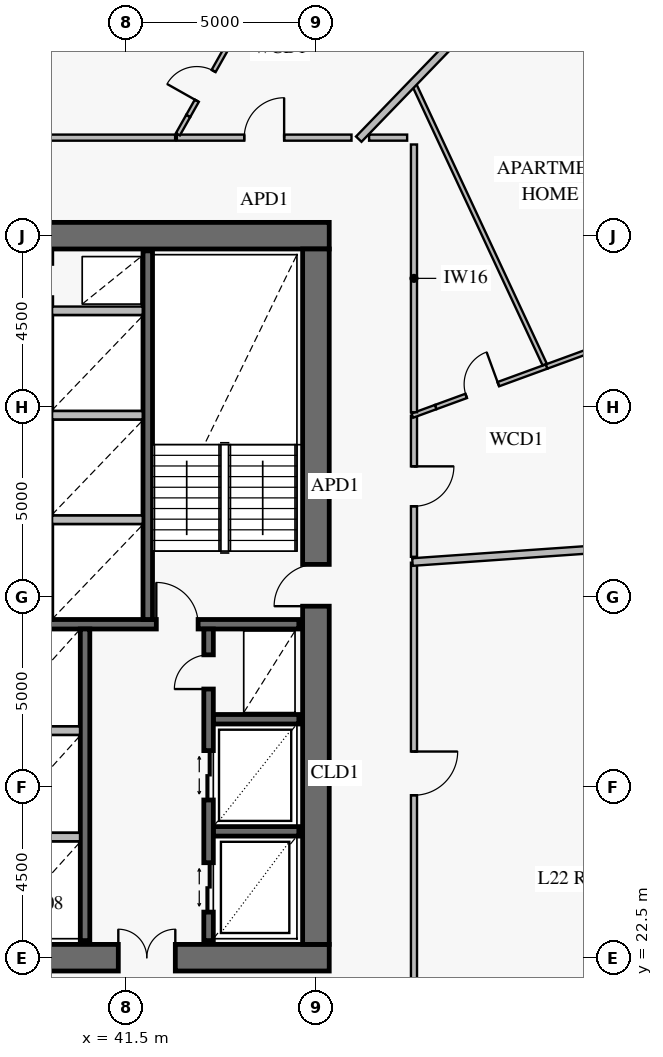
"""IFC4 building model, lengths in metres.
Left out: names, types, materials, properties, quantities, classifications, styles, units other than length and angle.
Written with IfcOpenShell. Run it as: python <this file> out.ifc"""

import sys

from ifc_helpers import new_model, si_unit, direction, frame, frame_2d, origin, place, context, subcontext, project, spatial, rectangle, extrude, element, fill, save


model = new_model("IFC4")
c1 = context("Model", 3, precision=1e-05, world=origin(), true_north=direction((0.0, 1.0)))
c2 = subcontext(c1, "Body", "Model", "MODEL_VIEW")
j1 = project(units=[si_unit("LENGTHUNIT", "METRE"), si_unit("PLANEANGLEUNIT", "RADIAN")], contexts=[c1])
p1 = place(None, origin())
s1 = spatial("IfcSite", under=j1, at=p1, CompositionType="ELEMENT")
p2 = place(p1, origin())
s2 = spatial("IfcBuilding", under=s1, at=p2, CompositionType="ELEMENT")
p3 = place(p2, frame((0.0, 0.0, 92.4)))
s3 = spatial("IfcBuildingStorey", under=s2, at=p3, CompositionType="ELEMENT", Elevation=92.4)
p4 = place(p3, frame((37.35, 22.5, 0.0), z_axis=(0.0, 0.0, 1.0), x_axis=(1.0, 0.0, 0.0)))
e1 = element("IfcWall", 1, at=p4, inside=s3, PredefinedType="SHEAR", context=c2, shape_type="SweptSolid", body=[
    extrude(rectangle(XDim=9.5, YDim=0.7, at=frame_2d((4.75, 0.0))), origin(), (0.0, 0.0, 1.0), 3.8),
])
p5 = place(p4, frame((3.95, 0.0, 0.0)))
e2 = element("IfcOpeningElement", 2, at=p5, cuts=e1, PredefinedType="OPENING", context=c2, shape_type="SweptSolid", body=[
    extrude(rectangle(XDim=1.5, YDim=2.15, at=frame_2d((0.75, 1.075))), frame((0.0, 0.362, 0.0), z_axis=(0.0, -1.0, 0.0), x_axis=(1.0, 0.0, 0.0)), (0.0, 0.0, 1.0), 0.724),
])
p6 = place(p3, frame((46.85, 41.5, 0.0), z_axis=(0.0, 0.0, 1.0), x_axis=(-1.0, 0.0, 0.0)))
e3 = element("IfcWall", 3, at=p6, inside=s3, PredefinedType="SHEAR", context=c2, shape_type="SweptSolid", body=[
    extrude(rectangle(XDim=7.9, YDim=0.7, at=frame_2d((3.95, 0.0))), origin(), (0.0, 0.0, 1.0), 3.8),
])
p7 = place(p3, frame((46.5, 22.85, 0.0), z_axis=(0.0, 0.0, 1.0), x_axis=(0.0, 1.0, 0.0)))
e4 = element("IfcWall", 4, at=p7, inside=s3, PredefinedType="SHEAR", context=c2, shape_type="SweptSolid", body=[
    extrude(rectangle(XDim=18.3, YDim=0.7, at=frame_2d((9.15, 0.0))), origin(), (0.0, 0.0, 1.0), 3.8),
])
p8 = place(p7, frame((8.9, 0.0, 0.0)))
e5 = element("IfcOpeningElement", 5, at=p8, cuts=e4, PredefinedType="OPENING", context=c2, shape_type="SweptSolid", body=[
    extrude(rectangle(XDim=1.1, YDim=2.15, at=frame_2d((0.55, 1.075))), frame((0.0, 0.362, 0.0), z_axis=(0.0, -1.0, 0.0), x_axis=(1.0, 0.0, 0.0)), (0.0, 0.0, 1.0), 0.724),
])
p9 = place(p3, frame((25.95, 31.275, 0.0), z_axis=(0.0, 0.0, 1.0), x_axis=(1.0, 0.0, 0.0)))
e6 = element("IfcWall", 6, at=p9, inside=s3, PredefinedType="SOLIDWALL", context=c2, shape_type="SweptSolid", body=[
    extrude(rectangle(XDim=20.1, YDim=0.25, at=frame_2d((10.05, 0.0))), origin(), (0.0, 0.0, 1.0), 3.8),
])
p10 = place(p9, frame((2.6, 0.0, 0.0)))
e7 = element("IfcOpeningElement", 7, at=p10, cuts=e6, PredefinedType="OPENING", context=c2, shape_type="SweptSolid", body=[
    extrude(rectangle(XDim=1.1, YDim=2.15, at=frame_2d((0.55, 1.075))), frame((0.0, 0.137, 0.0), z_axis=(0.0, -1.0, 0.0), x_axis=(1.0, 0.0, 0.0)), (0.0, 0.0, 1.0), 0.274),
])
p11 = place(p9, frame((10.6, 0.0, 0.0)))
e8 = element("IfcOpeningElement", 8, at=p11, cuts=e6, PredefinedType="OPENING", context=c2, shape_type="SweptSolid", body=[
    extrude(rectangle(XDim=1.1, YDim=2.15, at=frame_2d((0.55, 1.075))), frame((0.0, 0.137, 0.0), z_axis=(0.0, -1.0, 0.0), x_axis=(1.0, 0.0, 0.0)), (0.0, 0.0, 1.0), 0.274),
])
p12 = place(p9, frame((16.35, 0.0, 0.0)))
e9 = element("IfcOpeningElement", 9, at=p12, cuts=e6, PredefinedType="OPENING", context=c2, shape_type="SweptSolid", body=[
    extrude(rectangle(XDim=1.1, YDim=2.15, at=frame_2d((0.55, 1.075))), frame((0.0, 0.137, 0.0), z_axis=(0.0, -1.0, 0.0), x_axis=(1.0, 0.0, 0.0)), (0.0, 0.0, 1.0), 0.274),
])
p13 = place(p3, frame((42.075, 31.4, 0.0), z_axis=(0.0, 0.0, 1.0), x_axis=(0.0, 1.0, 0.0)))
e10 = element("IfcWall", 10, at=p13, inside=s3, PredefinedType="SOLIDWALL", context=c2, shape_type="SweptSolid", body=[
    extrude(rectangle(XDim=9.7, YDim=0.25, at=frame_2d((4.85, 0.0))), origin(), (0.0, 0.0, 1.0), 3.8),
])
p14 = place(p3, frame((40.425, 22.95, 0.0), z_axis=(0.0, 0.0, 1.0), x_axis=(0.0, 1.0, 0.0)))
e11 = element("IfcWall", 11, at=p14, inside=s3, PredefinedType="SOLIDWALL", context=c2, shape_type="SweptSolid", body=[
    extrude(rectangle(XDim=8.2, YDim=0.25, at=frame_2d((4.1, 0.0))), origin(), (0.0, 0.0, 1.0), 3.8),
])
for number, where, z_axis, x_axis in (
    (12, (43.8, 25.825, 0.0), (0.0, 0.0, 1.0), (1.0, 0.0, 0.0)),
    (13, (43.8, 28.775, 0.0), (0.0, 0.0, 1.0), (1.0, 0.0, 0.0)),
):
    element("IfcWall", number, at=place(p3, frame(where, z_axis=z_axis, x_axis=x_axis)), inside=s3, PredefinedType="SOLIDWALL", context=c2, shape_type="SweptSolid", body=[
        extrude(rectangle(XDim=2.25, YDim=0.25, at=frame_2d((1.125, 0.0))), origin(), (0.0, 0.0, 1.0), 3.8),
    ])
p15 = place(p3, frame((43.675, 22.95, 0.0), z_axis=(0.0, 0.0, 1.0), x_axis=(0.0, 1.0, 0.0)))
e14 = element("IfcWall", 14, at=p15, inside=s3, PredefinedType="SOLIDWALL", context=c2, shape_type="SweptSolid", body=[
    extrude(rectangle(XDim=8.2, YDim=0.25, at=frame_2d((4.1, 0.0))), origin(), (0.0, 0.0, 1.0), 3.8),
])
p16 = place(p15, frame((0.75, 0.0, 0.0)))
e15 = element("IfcOpeningElement", 15, at=p16, cuts=e14, PredefinedType="OPENING", context=c2, shape_type="SweptSolid", body=[
    extrude(rectangle(XDim=1.3, YDim=2.3, at=frame_2d((0.65, 1.15))), frame((0.0, 0.137, 0.0), z_axis=(0.0, -1.0, 0.0), x_axis=(1.0, 0.0, 0.0)), (0.0, 0.0, 1.0), 0.274),
])
p17 = place(p15, frame((3.7, 0.0, 0.0)))
e16 = element("IfcOpeningElement", 16, at=p17, cuts=e14, PredefinedType="OPENING", context=c2, shape_type="SweptSolid", body=[
    extrude(rectangle(XDim=1.3, YDim=2.3, at=frame_2d((0.65, 1.15))), frame((0.0, 0.137, 0.0), z_axis=(0.0, -1.0, 0.0), x_axis=(1.0, 0.0, 0.0)), (0.0, 0.0, 1.0), 0.274),
])
p18 = place(p15, frame((6.62, 0.0, 0.0)))
e17 = element("IfcOpeningElement", 17, at=p18, cuts=e14, PredefinedType="OPENING", context=c2, shape_type="SweptSolid", body=[
    extrude(rectangle(XDim=0.9, YDim=2.1, at=frame_2d((0.45, 1.05))), frame((0.0, 0.137, 0.0), z_axis=(0.0, -1.0, 0.0), x_axis=(1.0, 0.0, 0.0)), (0.0, 0.0, 1.0), 0.274),
])
p19 = place(p3, frame((49.65, 36.99, 0.0), z_axis=(0.0, 0.0, 1.0), x_axis=(0.93920992581, 0.343343436314, 0.0)))
e18 = element("IfcWall", 18, at=p19, inside=s3, PredefinedType="PARTITIONING", context=c2, shape_type="SweptSolid", body=[
    extrude(rectangle(XDim=3.11, YDim=0.12, at=frame_2d((1.555, 0.0))), origin(), (0.0, 0.0, 1.0), 3.55),
])
p20 = place(p19, frame((0.856, 0.0, 0.0)))
e19 = element("IfcOpeningElement", 19, at=p20, cuts=e18, PredefinedType="OPENING", context=c2, shape_type="SweptSolid", body=[
    extrude(rectangle(XDim=0.9, YDim=2.1, at=frame_2d((0.45, 1.05))), frame((0.0, 0.072, 0.0), z_axis=(0.0, -1.0, 0.0), x_axis=(1.0, 0.0, 0.0)), (0.0, 0.0, 1.0), 0.144),
])
p21 = place(p3, frame((52.571, 38.058, 0.0), z_axis=(0.0, 0.0, 1.0), x_axis=(0.93922057819, 0.343314295515, 0.0)))
e20 = element("IfcWall", 20, at=p21, inside=s3, PredefinedType="PARTITIONING", context=c2, shape_type="SweptSolid", body=[
    extrude(rectangle(XDim=6.486, YDim=0.12, at=frame_2d((3.243, 0.0))), origin(), (0.0, 0.0, 1.0), 3.1),
])
p22 = place(p21, frame((3.616, 0.0, 0.0)))
e21 = element("IfcOpeningElement", 21, at=p22, cuts=e20, PredefinedType="OPENING", context=c2, shape_type="SweptSolid", body=[
    extrude(rectangle(XDim=0.95, YDim=2.1, at=frame_2d((0.475, 1.05))), frame((0.0, 0.072, 0.0), z_axis=(0.0, -1.0, 0.0), x_axis=(1.0, 0.0, 0.0)), (0.0, 0.0, 1.0), 0.144),
])
p23 = place(p3, frame((49.08, 33.05, 0.0), z_axis=(0.0, 0.0, 1.0), x_axis=(0.0, 1.0, 0.0)))
e22 = element("IfcWall", 22, at=p23, inside=s3, PredefinedType="PARTITIONING", context=c2, shape_type="SweptSolid", body=[
    extrude(rectangle(XDim=3.71, YDim=0.16, at=frame_2d((1.855, 0.0))), origin(), (0.0, 0.0, 1.0), 2.85),
])
p24 = place(p23, frame((1.33, 0.0, 0.0)))
e23 = element("IfcOpeningElement", 23, at=p24, cuts=e22, PredefinedType="OPENING", context=c2, shape_type="SweptSolid", body=[
    extrude(rectangle(XDim=1.05, YDim=2.15, at=frame_2d((0.525, 1.075))), frame((0.0, 0.092, 0.0), z_axis=(0.0, -1.0, 0.0), x_axis=(1.0, 0.0, 0.0)), (0.0, 0.0, 1.0), 0.184),
])
p25 = place(p3, frame((43.139, 44.65, 0.0), z_axis=(0.0, 0.0, 1.0), x_axis=(0.491544748093, 0.870852318492, 0.0)))
e24 = element("IfcWall", 24, at=p25, inside=s3, PredefinedType="PARTITIONING", context=c2, shape_type="SweptSolid", body=[
    extrude(rectangle(XDim=2.167, YDim=0.12, at=frame_2d((1.083, 0.0))), origin(), (0.0, 0.0, 1.0), 3.55),
])
p26 = place(p25, frame((0.46, 0.0, 0.0)))
e25 = element("IfcOpeningElement", 25, at=p26, cuts=e24, PredefinedType="OPENING", context=c2, shape_type="SweptSolid", body=[
    extrude(rectangle(XDim=0.9, YDim=2.1, at=frame_2d((0.45, 1.05))), frame((0.0, 0.072, 0.0), z_axis=(0.0, -1.0, 0.0), x_axis=(1.0, 0.0, 0.0)), (0.0, 0.0, 1.0), 0.144),
])
p27 = place(p3, frame((47.436, 44.08, 0.0), z_axis=(0.0, 0.0, 1.0), x_axis=(-1.0, 0.0, 0.0)))
e26 = element("IfcWall", 26, at=p27, inside=s3, PredefinedType="PARTITIONING", context=c2, shape_type="SweptSolid", body=[
    extrude(rectangle(XDim=4.595, YDim=0.16, at=frame_2d((2.297, 0.0))), origin(), (0.0, 0.0, 1.0), 3.55),
])
p28 = place(p27, frame((1.772, 0.0, 0.0)))
e27 = element("IfcOpeningElement", 27, at=p28, cuts=e26, PredefinedType="OPENING", context=c2, shape_type="SweptSolid", body=[
    extrude(rectangle(XDim=1.05, YDim=2.15, at=frame_2d((0.525, 1.075))), frame((0.0, 0.092, 0.0), z_axis=(0.0, -1.0, 0.0), x_axis=(1.0, 0.0, 0.0)), (0.0, 0.0, 1.0), 0.184),
])
p29 = place(p3, frame((49.08, 21.806, 0.0), z_axis=(0.0, 0.0, 1.0), x_axis=(0.0, 1.0, 0.0)))
e28 = element("IfcWall", 28, at=p29, inside=s3, PredefinedType="PARTITIONING", context=c2, shape_type="SweptSolid", body=[
    extrude(rectangle(XDim=11.088, YDim=0.16, at=frame_2d((5.544, 0.0))), origin(), (0.0, 0.0, 1.0), 2.85),
])
p30 = place(p29, frame((4.969, 0.0, 0.0)))
e29 = element("IfcOpeningElement", 29, at=p30, cuts=e28, PredefinedType="OPENING", context=c2, shape_type="SweptSolid", body=[
    extrude(rectangle(XDim=1.15, YDim=2.2, at=frame_2d((0.575, 1.1))), frame((0.0, 0.092, 0.0), z_axis=(0.0, -1.0, 0.0), x_axis=(1.0, 0.0, 0.0)), (0.0, 0.0, 1.0), 0.184),
])
for number, where, z_axis, x_axis in (
    (30, (39.558, 34.025, 0.0), (0.0, 0.0, 1.0), (1.0, 0.0, 0.0)),
    (31, (39.558, 36.775, 0.0), (0.0, 0.0, 1.0), (1.0, 0.0, 0.0)),
    (32, (39.558, 39.525, 0.0), (0.0, 0.0, 1.0), (1.0, 0.0, 0.0)),
):
    element("IfcWall", number, at=place(p3, frame(where, z_axis=z_axis, x_axis=x_axis)), inside=s3, PredefinedType="PARTITIONING", context=c2, shape_type="SweptSolid", body=[
        extrude(rectangle(XDim=2.384, YDim=0.22, at=frame_2d((1.192, 0.0))), origin(), (0.0, 0.0, 1.0), 3.55),
    ])
for number, where, z_axis, x_axis in (
    (33, (38.008, 25.675, 0.0), (0.0, 0.0, 1.0), (1.0, 0.0, 0.0)),
    (34, (38.008, 28.475, 0.0), (0.0, 0.0, 1.0), (1.0, 0.0, 0.0)),
):
    element("IfcWall", number, at=place(p3, frame(where, z_axis=z_axis, x_axis=x_axis)), inside=s3, PredefinedType="PARTITIONING", context=c2, shape_type="SweptSolid", body=[
        extrude(rectangle(XDim=2.284, YDim=0.22, at=frame_2d((1.142, 0.0))), origin(), (0.0, 0.0, 1.0), 3.55),
    ])
p31 = place(p3, frame((49.04, 32.912, 0.0), z_axis=(0.0, 0.0, 1.0), x_axis=(0.99756386753, 0.069759086856, 0.0)))
e35 = element("IfcWall", 35, at=p31, inside=s3, PredefinedType="PARTITIONING", context=c2, shape_type="SweptSolid", body=[
    extrude(rectangle(XDim=19.147, YDim=0.2, at=frame_2d((9.574, 0.0))), origin(), (0.0, 0.0, 1.0), 2.8),
])
p32 = place(p3, frame((49.037, 36.765, 0.0), z_axis=(0.0, 0.0, 1.0), x_axis=(0.939125794288, 0.343573489232, 0.0)))
e36 = element("IfcWall", 36, at=p32, inside=s3, PredefinedType="PARTITIONING", context=c2, shape_type="SweptSolid", body=[
    extrude(rectangle(XDim=0.653, YDim=0.12, at=frame_2d((0.327, 0.0))), origin(), (0.0, 0.0, 1.0), 3.55),
])
p33 = place(p3, frame((52.519, 38.111, 0.0), z_axis=(0.0, 0.0, 1.0), x_axis=(-0.422610316209, 0.906311492057, 0.0)))
e37 = element("IfcWall", 37, at=p33, inside=s3, PredefinedType="PARTITIONING", context=c2, shape_type="SweptSolid", body=[
    extrude(rectangle(XDim=8.113, YDim=0.12, at=frame_2d((4.056, 0.0))), origin(), (0.0, 0.0, 1.0), 2.85),
])
p34 = place(p3, frame((47.627, 44.04, 0.0), z_axis=(0.0, 0.0, 1.0), x_axis=(0.694659610847, 0.719338602508, 0.0)))
e38 = element("IfcWall", 38, at=p34, inside=s3, PredefinedType="PARTITIONING", context=c2, shape_type="SweptSolid", body=[
    extrude(rectangle(XDim=11.98, YDim=0.2, at=frame_2d((5.99, 0.0))), origin(), (0.0, 0.0, 1.0), 2.8),
])
p35 = place(p3, frame((42.867, 44.168, 0.0), z_axis=(0.0, 0.0, 1.0), x_axis=(0.491475647569, 0.870891318045, 0.0)))
e39 = element("IfcWall", 39, at=p35, inside=s3, PredefinedType="PARTITIONING", context=c2, shape_type="SweptSolid", body=[
    extrude(rectangle(XDim=0.553, YDim=0.12, at=frame_2d((0.277, 0.0))), origin(), (0.0, 0.0, 1.0), 3.55),
])
p36 = place(p3, frame((49.08, 36.854, 0.0), z_axis=(0.0, 0.0, 1.0), x_axis=(0.0, 1.0, 0.0)))
e40 = element("IfcWall", 40, at=p36, inside=s3, PredefinedType="PARTITIONING", context=c2, shape_type="SweptSolid", body=[
    extrude(rectangle(XDim=7.046, YDim=0.16, at=frame_2d((3.523, 0.0))), origin(), (0.0, 0.0, 1.0), 3.55),
])
p37 = place(p3, frame((48.9, 44.08, 0.0), z_axis=(0.0, 0.0, 1.0), x_axis=(-1.0, 0.0, 0.0)))
e41 = element("IfcWall", 41, at=p37, inside=s3, PredefinedType="PARTITIONING", context=c2, shape_type="SweptSolid", body=[
    extrude(rectangle(XDim=1.001, YDim=0.16, at=frame_2d((0.5, 0.0))), origin(), (0.0, 0.0, 1.0), 2.85),
])
p38 = place(p3, frame((42.795, 44.08, 0.0), z_axis=(0.0, 0.0, 1.0), x_axis=(-1.0, 0.0, 0.0)))
e42 = element("IfcWall", 42, at=p38, inside=s3, PredefinedType="PARTITIONING", context=c2, shape_type="SweptSolid", body=[
    extrude(rectangle(XDim=5.398, YDim=0.16, at=frame_2d((2.699, 0.0))), origin(), (0.0, 0.0, 1.0), 2.85),
])
p39 = place(p8, origin())
e43 = element("IfcDoor", 43, at=p39, inside=s3, OperationType="SINGLE_SWING_LEFT", PredefinedType="USERDEFINED", context=c2, shape_type="SweptSolid", body=[
    extrude(rectangle(XDim=1.1, YDim=2.15, at=frame_2d((0.55, 1.075))), frame((0.0, 0.025, 0.0), z_axis=(0.0, -1.0, 0.0), x_axis=(1.0, 0.0, 0.0)), (0.0, 0.0, 1.0), 0.05),
])
fill(e5, e43)
p40 = place(p5, origin())
e44 = element("IfcDoor", 44, at=p40, inside=s3, OperationType="DOUBLE_DOOR_SINGLE_SWING", PredefinedType="DOOR", context=c2, shape_type="SweptSolid", body=[
    extrude(rectangle(XDim=1.5, YDim=2.15, at=frame_2d((0.75, 1.075))), frame((0.0, 0.025, 0.0), z_axis=(0.0, -1.0, 0.0), x_axis=(1.0, 0.0, 0.0)), (0.0, 0.0, 1.0), 0.05),
])
fill(e2, e44)
p41 = place(p12, origin())
e45 = element("IfcDoor", 45, at=p41, inside=s3, OperationType="SINGLE_SWING_LEFT", PredefinedType="USERDEFINED", context=c2, shape_type="SweptSolid", body=[
    extrude(rectangle(XDim=1.1, YDim=2.15, at=frame_2d((0.55, 1.075))), frame((0.0, 0.025, 0.0), z_axis=(0.0, -1.0, 0.0), x_axis=(1.0, 0.0, 0.0)), (0.0, 0.0, 1.0), 0.05),
])
fill(e9, e45)
p42 = place(p16, origin())
e46 = element("IfcDoor", 46, at=p42, inside=s3, OperationType="DOUBLE_DOOR_SLIDING", PredefinedType="DOOR", context=c2, shape_type="SweptSolid", body=[
    extrude(rectangle(XDim=1.3, YDim=2.3, at=frame_2d((0.65, 1.15))), frame((0.0, 0.025, 0.0), z_axis=(0.0, -1.0, 0.0), x_axis=(1.0, 0.0, 0.0)), (0.0, 0.0, 1.0), 0.05),
])
fill(e15, e46)
p43 = place(p17, origin())
e47 = element("IfcDoor", 47, at=p43, inside=s3, OperationType="DOUBLE_DOOR_SLIDING", PredefinedType="DOOR", context=c2, shape_type="SweptSolid", body=[
    extrude(rectangle(XDim=1.3, YDim=2.3, at=frame_2d((0.65, 1.15))), frame((0.0, 0.025, 0.0), z_axis=(0.0, -1.0, 0.0), x_axis=(1.0, 0.0, 0.0)), (0.0, 0.0, 1.0), 0.05),
])
fill(e16, e47)
p44 = place(p18, origin())
e48 = element("IfcDoor", 48, at=p44, inside=s3, OperationType="SINGLE_SWING_LEFT", PredefinedType="DOOR", context=c2, shape_type="SweptSolid", body=[
    extrude(rectangle(XDim=0.9, YDim=2.1, at=frame_2d((0.45, 1.05))), frame((0.0, 0.025, 0.0), z_axis=(0.0, -1.0, 0.0), x_axis=(1.0, 0.0, 0.0)), (0.0, 0.0, 1.0), 0.05),
])
fill(e17, e48)
p45 = place(p20, origin())
e49 = element("IfcDoor", 49, at=p45, inside=s3, OperationType="SINGLE_SWING_RIGHT", PredefinedType="DOOR", context=c2, shape_type="SweptSolid", body=[
    extrude(rectangle(XDim=0.9, YDim=2.1, at=frame_2d((0.45, 1.05))), frame((0.0, 0.025, 0.0), z_axis=(0.0, -1.0, 0.0), x_axis=(1.0, 0.0, 0.0)), (0.0, 0.0, 1.0), 0.05),
])
fill(e19, e49)
p46 = place(p24, frame((1.05, 0.0, 0.0), z_axis=(0.0, 0.0, 1.0), x_axis=(-1.0, 0.0, 0.0)))
e50 = element("IfcDoor", 50, at=p46, inside=s3, OperationType="SINGLE_SWING_LEFT", PredefinedType="DOOR", context=c2, shape_type="SweptSolid", body=[
    extrude(rectangle(XDim=1.05, YDim=2.15, at=frame_2d((0.525, 1.075))), frame((0.0, 0.025, 0.0), z_axis=(0.0, -1.0, 0.0), x_axis=(1.0, 0.0, 0.0)), (0.0, 0.0, 1.0), 0.05),
])
fill(e23, e50)
p47 = place(p26, origin())
e51 = element("IfcDoor", 51, at=p47, inside=s3, OperationType="SINGLE_SWING_LEFT", PredefinedType="DOOR", context=c2, shape_type="SweptSolid", body=[
    extrude(rectangle(XDim=0.9, YDim=2.1, at=frame_2d((0.45, 1.05))), frame((0.0, 0.025, 0.0), z_axis=(0.0, -1.0, 0.0), x_axis=(1.0, 0.0, 0.0)), (0.0, 0.0, 1.0), 0.05),
])
fill(e25, e51)
p48 = place(p28, frame((1.05, 0.0, 0.0), z_axis=(0.0, 0.0, 1.0), x_axis=(-1.0, 0.0, 0.0)))
e52 = element("IfcDoor", 52, at=p48, inside=s3, OperationType="SINGLE_SWING_RIGHT", PredefinedType="DOOR", context=c2, shape_type="SweptSolid", body=[
    extrude(rectangle(XDim=1.05, YDim=2.15, at=frame_2d((0.525, 1.075))), frame((0.0, 0.025, 0.0), z_axis=(0.0, -1.0, 0.0), x_axis=(1.0, 0.0, 0.0)), (0.0, 0.0, 1.0), 0.05),
])
fill(e27, e52)
p49 = place(p30, frame((1.15, 0.0, 0.0), z_axis=(0.0, 0.0, 1.0), x_axis=(-1.0, 0.0, 0.0)))
e53 = element("IfcDoor", 53, at=p49, inside=s3, OperationType="SINGLE_SWING_LEFT", PredefinedType="DOOR", context=c2, shape_type="SweptSolid", body=[
    extrude(rectangle(XDim=1.15, YDim=2.2, at=frame_2d((0.575, 1.1))), frame((0.0, 0.025, 0.0), z_axis=(0.0, -1.0, 0.0), x_axis=(1.0, 0.0, 0.0)), (0.0, 0.0, 1.0), 0.05),
])
fill(e29, e53)
save(model, sys.argv[1])
